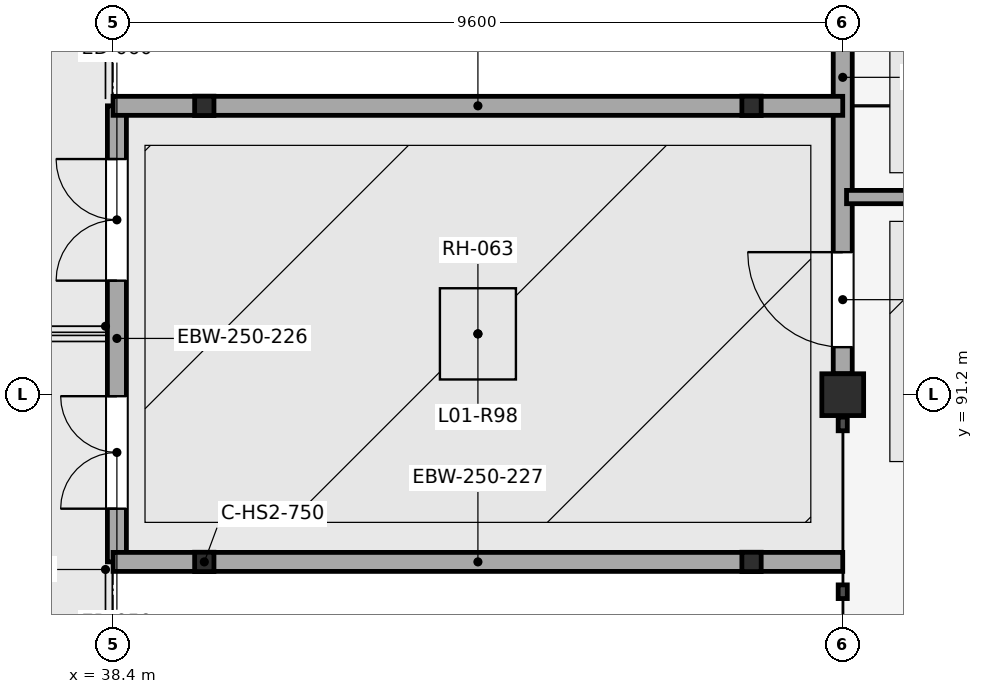
"""IFC4 building model, lengths in metres.
Left out: names, types, materials, properties, quantities, classifications, styles, units other than length and angle.
Written with IfcOpenShell. Run it as: python <this file> out.ifc"""

import sys

from ifc_helpers import new_model, si_unit, direction, frame, frame_2d, origin, origin_2d, place, context, subcontext, project, spatial, rectangle, hollow_rectangle, extrude, element, fill, save


model = new_model("IFC4")
c1 = context("Model", 3, precision=1e-05, world=origin(), true_north=direction((0.0, 1.0)))
c2 = subcontext(c1, "Body", "Model", "MODEL_VIEW")
j1 = project(units=[si_unit("LENGTHUNIT", "METRE"), si_unit("PLANEANGLEUNIT", "RADIAN")], contexts=[c1])
p1 = place(None, origin())
s1 = spatial("IfcSite", under=j1, at=p1, CompositionType="ELEMENT")
p2 = place(p1, origin())
s2 = spatial("IfcBuilding", under=s1, at=p2, CompositionType="ELEMENT")
p3 = place(p2, frame((0.0, 0.0, 4.8)))
s3 = spatial("IfcBuildingStorey", under=s2, at=p3, CompositionType="ELEMENT", Elevation=4.8)
p4 = place(p3, frame((48.0, 91.2, 0.0), z_axis=(0.0, 0.0, 1.0), x_axis=(1.0, 0.0, 0.0)))
e1 = element("IfcColumn", 1, at=p4, inside=s3, PredefinedType="COLUMN", context=c2, shape_type="SweptSolid", body=[
    extrude(rectangle(XDim=0.55, YDim=0.55, at=origin_2d()), origin(), (0.0, 0.0, 1.0), 4.8),
])
for number, where, z_axis, x_axis in (
    (2, (39.6, 89.0, 0.0), (0.0, 0.0, 1.0), (1.0, 0.0, 0.0)),
    (3, (39.6, 95.0, 0.0), (0.0, 0.0, 1.0), (1.0, 0.0, 0.0)),
    (4, (46.8, 89.0, 0.0), (0.0, 0.0, 1.0), (1.0, 0.0, 0.0)),
    (5, (46.8, 95.0, 0.0), (0.0, 0.0, 1.0), (1.0, 0.0, 0.0)),
):
    element("IfcColumn", number, at=place(p3, frame(where, z_axis=z_axis, x_axis=x_axis)), inside=s3, PredefinedType="COLUMN", context=c2, shape_type="SweptSolid", body=[
        extrude(hollow_rectangle(XDim=0.254, YDim=0.254, WallThickness=0.012, at=origin_2d()), origin(), (0.0, 0.0, 1.0), 2.58),
    ])
p5 = place(p3, frame((48.0, 91.475, 0.0), z_axis=(0.0, 0.0, 1.0), x_axis=(0.0, 1.0, 0.0)))
e6 = element("IfcWall", 6, at=p5, inside=s3, PredefinedType="STANDARD", context=c2, shape_type="SweptSolid", body=[
    extrude(rectangle(XDim=9.05, YDim=0.25, at=frame_2d((4.525, 0.0))), origin(), (0.0, 0.0, 1.0), 4.046),
])
p6 = place(p5, frame((6.2, 0.0, 1.05)))
e7 = element("IfcOpeningElement", 7, at=p6, cuts=e6, PredefinedType="OPENING", context=c2, shape_type="SweptSolid", body=[
    extrude(rectangle(XDim=1.12, YDim=1.44, at=frame_2d((0.56, 0.72))), frame((0.0, 0.135, 0.0), z_axis=(0.0, -1.0, 0.0), x_axis=(1.0, 0.0, 0.0)), (0.0, 0.0, 1.0), 0.27),
])
p7 = place(p5, frame((0.35, 0.0, 0.0)))
e8 = element("IfcOpeningElement", 8, at=p7, cuts=e6, PredefinedType="OPENING", context=c2, shape_type="SweptSolid", body=[
    extrude(rectangle(XDim=1.25, YDim=2.15, at=frame_2d((0.625, 1.075))), frame((0.0, 0.135, 0.0), z_axis=(0.0, -1.0, 0.0), x_axis=(1.0, 0.0, 0.0)), (0.0, 0.0, 1.0), 0.27),
])
p8 = place(p3, frame((38.45, 89.0, 0.0), z_axis=(0.0, 0.0, 1.0), x_axis=(0.0, 1.0, 0.0)))
e9 = element("IfcWall", 9, at=p8, inside=s3, PredefinedType="STANDARD", context=c2, shape_type="SweptSolid", body=[
    extrude(rectangle(XDim=6.0, YDim=0.25, at=frame_2d((3.0, 0.0))), origin(), (0.0, 0.0, 1.0), 2.32),
])
p9 = place(p8, frame((0.7, 0.0, 0.0)))
e10 = element("IfcOpeningElement", 10, at=p9, cuts=e9, PredefinedType="OPENING", context=c2, shape_type="SweptSolid", body=[
    extrude(rectangle(XDim=1.48, YDim=2.11, at=frame_2d((0.74, 1.055))), frame((0.0, 0.135, 0.0), z_axis=(0.0, -1.0, 0.0), x_axis=(1.0, 0.0, 0.0)), (0.0, 0.0, 1.0), 0.27),
])
p10 = place(p8, frame((3.7, 0.0, 0.0)))
e11 = element("IfcOpeningElement", 11, at=p10, cuts=e9, PredefinedType="OPENING", context=c2, shape_type="SweptSolid", body=[
    extrude(rectangle(XDim=1.6, YDim=2.2, at=frame_2d((0.8, 1.1))), frame((0.0, 0.135, 0.0), z_axis=(0.0, -1.0, 0.0), x_axis=(1.0, 0.0, 0.0)), (0.0, 0.0, 1.0), 0.27),
])
for number, where, z_axis, x_axis in (
    (12, (38.4, 89.0, 0.0), (0.0, 0.0, 1.0), (1.0, 0.0, 0.0)),
    (13, (38.4, 95.0, 0.0), (0.0, 0.0, 1.0), (1.0, 0.0, 0.0)),
):
    element("IfcWall", number, at=place(p3, frame(where, z_axis=z_axis, x_axis=x_axis)), inside=s3, PredefinedType="STANDARD", context=c2, shape_type="SweptSolid", body=[
        extrude(rectangle(XDim=9.6, YDim=0.25, at=frame_2d((4.8, 0.0))), origin(), (0.0, 0.0, 1.0), 2.106),
    ])
p11 = place(p3, frame((48.05, 93.8, 0.0), z_axis=(0.0, 0.0, 1.0), x_axis=(1.0, 0.0, 0.0)))
e14 = element("IfcWall", 14, at=p11, inside=s3, PredefinedType="PARTITIONING", context=c2, shape_type="SweptSolid", body=[
    extrude(rectangle(XDim=19.05, YDim=0.175, at=frame_2d((9.525, 0.0))), origin(), (0.0, 0.0, 1.0), 4.42),
])
p12 = place(p11, frame((8.725, 0.0, 0.0)))
e15 = element("IfcOpeningElement", 15, at=p12, cuts=e14, PredefinedType="OPENING", context=c2, shape_type="SweptSolid", body=[
    extrude(rectangle(XDim=1.6, YDim=2.15, at=frame_2d((0.8, 1.075))), frame((0.0, 0.097, 0.0), z_axis=(0.0, -1.0, 0.0), x_axis=(1.0, 0.0, 0.0)), (0.0, 0.0, 1.0), 0.195),
])
p13 = place(p9, origin())
e16 = element("IfcDoor", 16, at=p13, inside=s3, OperationType="DOUBLE_DOOR_SINGLE_SWING", PredefinedType="DOOR", context=c2, shape_type="SweptSolid", body=[
    extrude(rectangle(XDim=1.48, YDim=2.11, at=frame_2d((0.74, 1.055))), frame((0.0, 0.025, 0.0), z_axis=(0.0, -1.0, 0.0), x_axis=(1.0, 0.0, 0.0)), (0.0, 0.0, 1.0), 0.05),
])
fill(e10, e16)
p14 = place(p10, origin())
e17 = element("IfcDoor", 17, at=p14, inside=s3, OperationType="DOUBLE_DOOR_SINGLE_SWING", PredefinedType="DOOR", context=c2, shape_type="SweptSolid", body=[
    extrude(rectangle(XDim=1.6, YDim=2.2, at=frame_2d((0.8, 1.1))), frame((0.0, 0.025, 0.0), z_axis=(0.0, -1.0, 0.0), x_axis=(1.0, 0.0, 0.0)), (0.0, 0.0, 1.0), 0.05),
])
fill(e11, e17)
p15 = place(p3, frame((0.0, 0.0, 2.58)))
p16 = place(p15, frame((43.2, 92.0, 0.17)))
e18 = element("IfcDoor", 18, at=p16, inside=s3, OperationType="SINGLE_SWING_LEFT", PredefinedType="TRAPDOOR", context=c2, shape_type="SweptSolid", body=[
    extrude(rectangle(XDim=1.0, YDim=1.2, at=origin_2d()), origin(), (0.0, 0.0, 1.0), 0.05),
])
p17 = place(p7, origin())
e19 = element("IfcDoor", 19, at=p17, inside=s3, OperationType="SINGLE_SWING_RIGHT", PredefinedType="DOOR", context=c2, shape_type="SweptSolid", body=[
    extrude(rectangle(XDim=1.25, YDim=2.15, at=frame_2d((0.625, 1.075))), frame((0.0, 0.025, 0.0), z_axis=(0.0, -1.0, 0.0), x_axis=(1.0, 0.0, 0.0)), (0.0, 0.0, 1.0), 0.05),
])
fill(e8, e19)
save(model, sys.argv[1])
